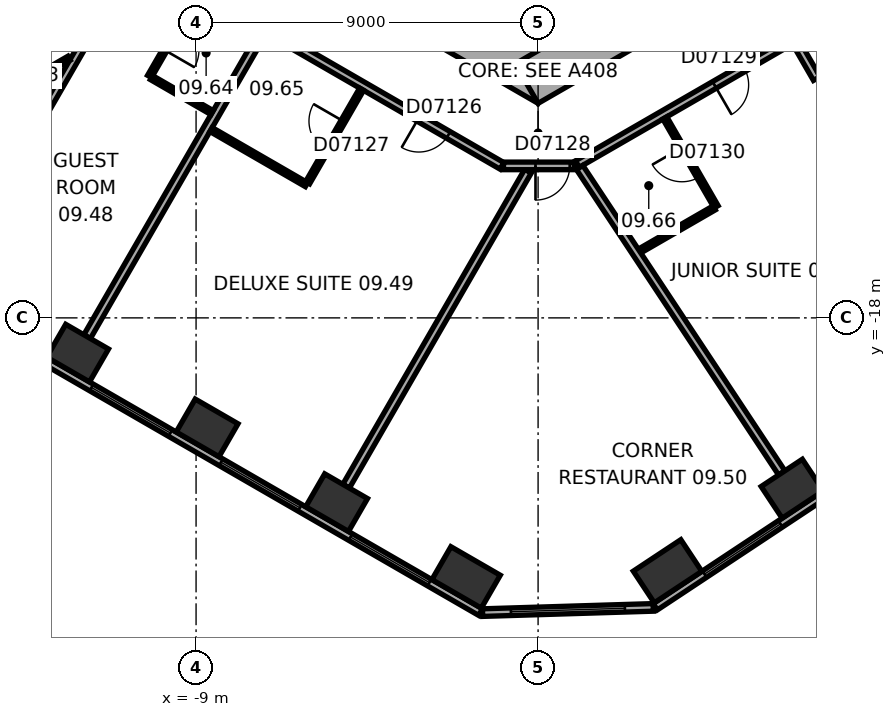
"""IFC4 building model, lengths in metres.
Left out: names, types, materials, properties, quantities, classifications, styles, units other than length and angle.
Written with IfcOpenShell. Run it as: python <this file> out.ifc"""

import sys

from ifc_helpers import new_model, si_unit, direction, frame, frame_2d, origin, origin_2d, place, context, subcontext, project, spatial, rectangle, extrude, element, fill, save


model = new_model("IFC4")
c1 = context("Model", 3, precision=1e-05, world=origin(), true_north=direction((0.0, 1.0)))
c2 = subcontext(c1, "Body", "Model", "MODEL_VIEW")
j1 = project(units=[si_unit("LENGTHUNIT", "METRE"), si_unit("PLANEANGLEUNIT", "RADIAN")], contexts=[c1])
p1 = place(None, origin())
s1 = spatial("IfcSite", under=j1, at=p1, CompositionType="ELEMENT")
p2 = place(p1, origin())
s2 = spatial("IfcBuilding", under=s1, at=p2, CompositionType="ELEMENT")
p3 = place(p2, frame((0.0, 0.0, 50.6)))
s3 = spatial("IfcBuildingStorey", under=s2, at=p3, CompositionType="ELEMENT", Elevation=50.6)
for number, where, z_axis, x_axis in (
    (1, (-12.117, -18.927, 0.0), (0.0, 0.0, 1.0), (0.866, -0.5, 0.0)),
    (2, (-8.71, -20.895, 0.0), (0.0, 0.0, 1.0), (0.866, -0.5, 0.0)),
    (3, (-5.302, -22.862, 0.0), (0.0, 0.0, 1.0), (0.866, -0.5, 0.0)),
):
    element("IfcColumn", number, at=place(p3, frame(where, z_axis=z_axis, x_axis=x_axis)), inside=s3, PredefinedType="COLUMN", context=c2, shape_type="SweptSolid", body=[
        extrude(rectangle(XDim=1.3, YDim=1.0, at=origin_2d()), origin(), (0.0, 0.0, 1.0), 3.3),
    ])
for number, where, z_axis, x_axis in (
    (4, (-1.895, -24.829, 0.0), (0.0, 0.0, 1.0), (0.866, -0.5, 0.0)),
    (5, (3.407, -24.667, 0.0), (0.0, 0.0, 1.0), (0.834, 0.552, 0.0)),
):
    element("IfcColumn", number, at=place(p3, frame(where, z_axis=z_axis, x_axis=x_axis)), inside=s3, PredefinedType="COLUMN", context=c2, shape_type="SweptSolid", body=[
        extrude(rectangle(XDim=1.5, YDim=1.0, at=origin_2d()), origin(), (0.0, 0.0, 1.0), 3.3),
    ])
p4 = place(p3, frame((6.688, -22.496, 0.0), z_axis=(0.0, 0.0, 1.0), x_axis=(0.833885822067, 0.551936985312, 0.0)))
e6 = element("IfcColumn", 6, at=p4, inside=s3, PredefinedType="COLUMN", context=c2, shape_type="SweptSolid", body=[
    extrude(rectangle(XDim=1.3, YDim=1.0, at=origin_2d()), origin(), (0.0, 0.0, 1.0), 3.3),
])
p5 = place(p3, frame((-10.4, -5.658, 0.0), z_axis=(0.0, 0.0, 1.0), x_axis=(0.866021384402, -0.500006961711, 0.0)))
e7 = element("IfcWall", 7, at=p5, inside=s3, PredefinedType="SHEAR", context=c2, shape_type="SweptSolid", body=[
    extrude(rectangle(XDim=12.355, YDim=1.2, at=frame_2d((6.178, 0.0))), origin(), (0.0, 0.0, 1.0), 3.3),
])
p6 = place(p5, frame((6.378, 0.0, 0.0)))
e8 = element("IfcOpeningElement", 8, at=p6, cuts=e7, PredefinedType="OPENING", context=c2, shape_type="SweptSolid", body=[
    extrude(rectangle(XDim=1.5, YDim=2.1, at=frame_2d((0.75, 1.05))), frame((0.0, 0.61, 0.0), z_axis=(0.0, -1.0, 0.0), x_axis=(1.0, 0.0, 0.0)), (0.0, 0.0, 1.0), 1.22),
])
p7 = place(p5, frame((3.228, 0.0, 0.0)))
e9 = element("IfcOpeningElement", 9, at=p7, cuts=e7, PredefinedType="OPENING", context=c2, shape_type="SweptSolid", body=[
    extrude(rectangle(XDim=0.9, YDim=2.1, at=frame_2d((0.45, 1.05))), frame((0.0, 0.61, 0.0), z_axis=(0.0, -1.0, 0.0), x_axis=(1.0, 0.0, 0.0)), (0.0, 0.0, 1.0), 1.22),
])
p8 = place(p3, frame((-0.3, -11.836, 0.0), z_axis=(0.0, 0.0, 1.0), x_axis=(0.866021384402, 0.500006961711, 0.0)))
e10 = element("IfcWall", 10, at=p8, inside=s3, PredefinedType="SHEAR", context=c2, shape_type="SweptSolid", body=[
    extrude(rectangle(XDim=12.355, YDim=1.2, at=frame_2d((6.178, 0.0))), origin(), (0.0, 0.0, 1.0), 3.3),
])
p9 = place(p8, frame((2.828, 0.0, 0.0)))
e11 = element("IfcOpeningElement", 11, at=p9, cuts=e10, PredefinedType="OPENING", context=c2, shape_type="SweptSolid", body=[
    extrude(rectangle(XDim=0.9, YDim=2.1, at=frame_2d((0.45, 1.05))), frame((0.0, 0.61, 0.0), z_axis=(0.0, -1.0, 0.0), x_axis=(1.0, 0.0, 0.0)), (0.0, 0.0, 1.0), 1.22),
])
p10 = place(p8, frame((5.428, 0.0, 0.0)))
e12 = element("IfcOpeningElement", 12, at=p10, cuts=e10, PredefinedType="OPENING", context=c2, shape_type="SweptSolid", body=[
    extrude(rectangle(XDim=0.9, YDim=2.1, at=frame_2d((0.45, 1.05))), frame((0.0, 0.61, 0.0), z_axis=(0.0, -1.0, 0.0), x_axis=(1.0, 0.0, 0.0)), (0.0, 0.0, 1.0), 1.22),
])
p11 = place(p8, frame((7.928, 0.0, 0.0)))
e13 = element("IfcOpeningElement", 13, at=p11, cuts=e10, PredefinedType="OPENING", context=c2, shape_type="SweptSolid", body=[
    extrude(rectangle(XDim=1.1, YDim=2.1, at=frame_2d((0.55, 1.05))), frame((0.0, 0.61, 0.0), z_axis=(0.0, -1.0, 0.0), x_axis=(1.0, 0.0, 0.0)), (0.0, 0.0, 1.0), 1.22),
])
p12 = place(p3, frame((-19.914, -15.119, 0.0), z_axis=(0.0, 0.0, 1.0), x_axis=(0.866025418898, -0.499999973822, 0.0)))
e14 = element("IfcWall", 14, at=p12, inside=s3, PredefinedType="STANDARD", context=c2, shape_type="SweptSolid", body=[
    extrude(rectangle(XDim=21.246, YDim=0.2, at=frame_2d((10.623, 0.0))), origin(), (0.0, 0.0, 1.0), 3.3),
])
p13 = place(p12, frame((1.555, 0.0, 0.8)))
e15 = element("IfcOpeningElement", 15, at=p13, cuts=e14, PredefinedType="OPENING", context=c2, shape_type="SweptSolid", body=[
    extrude(rectangle(XDim=2.4, YDim=1.7, at=frame_2d((1.2, 0.85))), frame((0.0, 0.11, 0.0), z_axis=(0.0, -1.0, 0.0), x_axis=(1.0, 0.0, 0.0)), (0.0, 0.0, 1.0), 0.22),
])
p14 = place(p12, frame((5.489, 0.0, 0.8)))
e16 = element("IfcOpeningElement", 16, at=p14, cuts=e14, PredefinedType="OPENING", context=c2, shape_type="SweptSolid", body=[
    extrude(rectangle(XDim=2.4, YDim=1.7, at=frame_2d((1.2, 0.85))), frame((0.0, 0.11, 0.0), z_axis=(0.0, -1.0, 0.0), x_axis=(1.0, 0.0, 0.0)), (0.0, 0.0, 1.0), 0.22),
])
p15 = place(p12, frame((9.424, 0.0, 0.8)))
e17 = element("IfcOpeningElement", 17, at=p15, cuts=e14, PredefinedType="OPENING", context=c2, shape_type="SweptSolid", body=[
    extrude(rectangle(XDim=2.4, YDim=1.7, at=frame_2d((1.2, 0.85))), frame((0.0, 0.11, 0.0), z_axis=(0.0, -1.0, 0.0), x_axis=(1.0, 0.0, 0.0)), (0.0, 0.0, 1.0), 0.22),
])
p16 = place(p12, frame((13.358, 0.0, 0.8)))
e18 = element("IfcOpeningElement", 18, at=p16, cuts=e14, PredefinedType="OPENING", context=c2, shape_type="SweptSolid", body=[
    extrude(rectangle(XDim=2.4, YDim=1.7, at=frame_2d((1.2, 0.85))), frame((0.0, 0.11, 0.0), z_axis=(0.0, -1.0, 0.0), x_axis=(1.0, 0.0, 0.0)), (0.0, 0.0, 1.0), 0.22),
])
p17 = place(p12, frame((17.293, 0.0, 0.8)))
e19 = element("IfcOpeningElement", 19, at=p17, cuts=e14, PredefinedType="OPENING", context=c2, shape_type="SweptSolid", body=[
    extrude(rectangle(XDim=2.4, YDim=1.7, at=frame_2d((1.2, 0.85))), frame((0.0, 0.11, 0.0), z_axis=(0.0, -1.0, 0.0), x_axis=(1.0, 0.0, 0.0)), (0.0, 0.0, 1.0), 0.22),
])
p18 = place(p3, frame((-1.461, -25.755, 0.0), z_axis=(0.0, 0.0, 1.0), x_axis=(0.999533823446, 0.030530898895, 0.0)))
e20 = element("IfcWall", 20, at=p18, inside=s3, PredefinedType="STANDARD", context=c2, shape_type="SweptSolid", body=[
    extrude(rectangle(XDim=4.494, YDim=0.2, at=frame_2d((2.247, 0.0))), origin(), (0.0, 0.0, 1.0), 3.3),
])
p19 = place(p18, frame((0.747, 0.0, 0.8)))
e21 = element("IfcOpeningElement", 21, at=p19, cuts=e20, PredefinedType="OPENING", context=c2, shape_type="SweptSolid", body=[
    extrude(rectangle(XDim=3.0, YDim=1.7, at=frame_2d((1.5, 0.85))), frame((0.0, 0.11, 0.0), z_axis=(0.0, -1.0, 0.0), x_axis=(1.0, 0.0, 0.0)), (0.0, 0.0, 1.0), 0.22),
])
p20 = place(p3, frame((3.083, -25.601, 0.0), z_axis=(0.0, 0.0, 1.0), x_axis=(0.833884295743, 0.551939291329, 0.0)))
e22 = element("IfcWall", 22, at=p20, inside=s3, PredefinedType="STANDARD", context=c2, shape_type="SweptSolid", body=[
    extrude(rectangle(XDim=21.246, YDim=0.2, at=frame_2d((10.623, 0.0))), origin(), (0.0, 0.0, 1.0), 3.3),
])
p21 = place(p20, frame((1.553, 0.0, 0.8)))
e23 = element("IfcOpeningElement", 23, at=p21, cuts=e22, PredefinedType="OPENING", context=c2, shape_type="SweptSolid", body=[
    extrude(rectangle(XDim=2.4, YDim=1.7, at=frame_2d((1.2, 0.85))), frame((0.0, 0.11, 0.0), z_axis=(0.0, -1.0, 0.0), x_axis=(1.0, 0.0, 0.0)), (0.0, 0.0, 1.0), 0.22),
])
p22 = place(p20, frame((5.488, 0.0, 0.8)))
e24 = element("IfcOpeningElement", 24, at=p22, cuts=e22, PredefinedType="OPENING", context=c2, shape_type="SweptSolid", body=[
    extrude(rectangle(XDim=2.4, YDim=1.7, at=frame_2d((1.2, 0.85))), frame((0.0, 0.11, 0.0), z_axis=(0.0, -1.0, 0.0), x_axis=(1.0, 0.0, 0.0)), (0.0, 0.0, 1.0), 0.22),
])
p23 = place(p20, frame((9.422, 0.0, 0.8)))
e25 = element("IfcOpeningElement", 25, at=p23, cuts=e22, PredefinedType="OPENING", context=c2, shape_type="SweptSolid", body=[
    extrude(rectangle(XDim=2.4, YDim=1.7, at=frame_2d((1.2, 0.85))), frame((0.0, 0.11, 0.0), z_axis=(0.0, -1.0, 0.0), x_axis=(1.0, 0.0, 0.0)), (0.0, 0.0, 1.0), 0.22),
])
p24 = place(p20, frame((13.357, 0.0, 0.8)))
e26 = element("IfcOpeningElement", 26, at=p24, cuts=e22, PredefinedType="OPENING", context=c2, shape_type="SweptSolid", body=[
    extrude(rectangle(XDim=2.4, YDim=1.7, at=frame_2d((1.2, 0.85))), frame((0.0, 0.11, 0.0), z_axis=(0.0, -1.0, 0.0), x_axis=(1.0, 0.0, 0.0)), (0.0, 0.0, 1.0), 0.22),
])
p25 = place(p20, frame((17.291, 0.0, 0.8)))
e27 = element("IfcOpeningElement", 27, at=p25, cuts=e22, PredefinedType="OPENING", context=c2, shape_type="SweptSolid", body=[
    extrude(rectangle(XDim=2.4, YDim=1.7, at=frame_2d((1.2, 0.85))), frame((0.0, 0.11, 0.0), z_axis=(0.0, -1.0, 0.0), x_axis=(1.0, 0.0, 0.0)), (0.0, 0.0, 1.0), 0.22),
])
p26 = place(p3, frame((-15.274, -16.527, 0.0), z_axis=(0.0, 0.0, 1.0), x_axis=(0.49998823431, 0.866032196602, 0.0)))
e28 = element("IfcWall", 28, at=p26, inside=s3, PredefinedType="PARTITIONING", context=c2, shape_type="SweptSolid", body=[
    extrude(rectangle(XDim=9.25, YDim=0.2, at=frame_2d((4.625, 0.0))), origin(), (0.0, 0.0, 1.0), 3.05),
])
p27 = place(p3, frame((-12.342, -11.167, 0.0), z_axis=(0.0, 0.0, 1.0), x_axis=(-0.865992557167, -0.500056887695, 0.0)))
e29 = element("IfcWall", 29, at=p27, inside=s3, PredefinedType="PARTITIONING", context=c2, shape_type="SweptSolid", body=[
    extrude(rectangle(XDim=1.769, YDim=0.12, at=frame_2d((0.885, 0.0))), origin(), (0.0, 0.0, 1.0), 3.05),
])
p28 = place(p3, frame((-11.867, -18.494, 0.0), z_axis=(0.0, 0.0, 1.0), x_axis=(0.499999662836, 0.866025598446, 0.0)))
e30 = element("IfcWall", 30, at=p28, inside=s3, PredefinedType="PARTITIONING", context=c2, shape_type="SweptSolid", body=[
    extrude(rectangle(XDim=9.25, YDim=0.2, at=frame_2d((4.625, 0.0))), origin(), (0.0, 0.0, 1.0), 2.6),
])
p29 = place(p3, frame((-11.615, -7.843, 0.0), z_axis=(0.0, 0.0, 1.0), x_axis=(0.866026466995, -0.499998158461, 0.0)))
e31 = element("IfcWall", 31, at=p29, inside=s3, PredefinedType="PARTITIONING", context=c2, shape_type="SweptSolid", body=[
    extrude(rectangle(XDim=12.315, YDim=0.2, at=frame_2d((6.158, 0.0))), origin(), (0.0, 0.0, 1.0), 3.05),
])
p30 = place(p29, frame((1.665, 0.0, 0.0)))
e32 = element("IfcOpeningElement", 32, at=p30, cuts=e31, PredefinedType="OPENING", context=c2, shape_type="SweptSolid", body=[
    extrude(rectangle(XDim=0.9, YDim=2.1, at=frame_2d((0.45, 1.05))), frame((0.0, 0.11, 0.0), z_axis=(0.0, -1.0, 0.0), x_axis=(1.0, 0.0, 0.0)), (0.0, 0.0, 1.0), 0.22),
])
p31 = place(p29, frame((9.787, 0.0, 0.0)))
e33 = element("IfcOpeningElement", 33, at=p31, cuts=e31, PredefinedType="OPENING", context=c2, shape_type="SweptSolid", body=[
    extrude(rectangle(XDim=0.9, YDim=2.1, at=frame_2d((0.45, 1.05))), frame((0.0, 0.11, 0.0), z_axis=(0.0, -1.0, 0.0), x_axis=(1.0, 0.0, 0.0)), (0.0, 0.0, 1.0), 0.22),
])
p32 = place(p3, frame((-10.224, -11.648, 0.0), z_axis=(0.0, 0.0, 1.0), x_axis=(0.500004234368, 0.866022959057, 0.0)))
e34 = element("IfcWall", 34, at=p32, inside=s3, PredefinedType="PARTITIONING", context=c2, shape_type="SweptSolid", body=[
    extrude(rectangle(XDim=2.5, YDim=0.12, at=frame_2d((1.25, 0.0))), origin(), (0.0, 0.0, 1.0), 3.05),
])
p33 = place(p32, frame((0.8, 0.0, 0.0)))
e35 = element("IfcOpeningElement", 35, at=p33, cuts=e34, PredefinedType="OPENING", context=c2, shape_type="SweptSolid", body=[
    extrude(rectangle(XDim=0.9, YDim=2.1, at=frame_2d((0.45, 1.05))), frame((0.0, 0.07, 0.0), z_axis=(0.0, -1.0, 0.0), x_axis=(1.0, 0.0, 0.0)), (0.0, 0.0, 1.0), 0.14),
])
p34 = place(p3, frame((-8.579, -12.598, 0.0), z_axis=(0.0, 0.0, 1.0), x_axis=(-0.866046386007, 0.499963655964, 0.0)))
e36 = element("IfcWall", 36, at=p34, inside=s3, PredefinedType="PARTITIONING", context=c2, shape_type="SweptSolid", body=[
    extrude(rectangle(XDim=1.84, YDim=0.12, at=frame_2d((0.92, 0.0))), origin(), (0.0, 0.0, 1.0), 3.05),
])
p35 = place(p3, frame((-6.094, -14.495, 0.0), z_axis=(0.0, 0.0, 1.0), x_axis=(-0.866032775405, 0.499987231761, 0.0)))
e37 = element("IfcWall", 37, at=p35, inside=s3, PredefinedType="PARTITIONING", context=c2, shape_type="SweptSolid", body=[
    extrude(rectangle(XDim=2.9, YDim=0.12, at=frame_2d((1.45, 0.0))), origin(), (0.0, 0.0, 1.0), 3.05),
])
p36 = place(p3, frame((-5.052, -22.429, 0.0), z_axis=(0.0, 0.0, 1.0), x_axis=(0.500004329283, 0.866022904257, 0.0)))
e38 = element("IfcWall", 38, at=p36, inside=s3, PredefinedType="PARTITIONING", context=c2, shape_type="SweptSolid", body=[
    extrude(rectangle(XDim=9.572, YDim=0.2, at=frame_2d((4.786, 0.0))), origin(), (0.0, 0.0, 1.0), 3.05),
])
p37 = place(p3, frame((-4.644, -11.983, 0.0), z_axis=(0.0, 0.0, 1.0), x_axis=(-0.499985389037, -0.866033839264, 0.0)))
e39 = element("IfcWall", 39, at=p37, inside=s3, PredefinedType="PARTITIONING", context=c2, shape_type="SweptSolid", body=[
    extrude(rectangle(XDim=2.84, YDim=0.12, at=frame_2d((1.42, 0.0))), origin(), (0.0, 0.0, 1.0), 3.05),
])
p38 = place(p37, frame((0.97, 0.0, 0.0)))
e40 = element("IfcOpeningElement", 40, at=p38, cuts=e39, PredefinedType="OPENING", context=c2, shape_type="SweptSolid", body=[
    extrude(rectangle(XDim=0.9, YDim=2.1, at=frame_2d((0.45, 1.05))), frame((0.0, 0.07, 0.0), z_axis=(0.0, -1.0, 0.0), x_axis=(1.0, 0.0, 0.0)), (0.0, 0.0, 1.0), 0.14),
])
p39 = place(p3, frame((-0.91, -14.001, 0.0), z_axis=(0.0, 0.0, 1.0), x_axis=(1.0, 0.0, 0.0)))
e41 = element("IfcWall", 41, at=p39, inside=s3, PredefinedType="PARTITIONING", context=c2, shape_type="SweptSolid", body=[
    extrude(rectangle(XDim=1.86, YDim=0.2, at=frame_2d((0.93, 0.0))), origin(), (0.0, 0.0, 1.0), 3.05),
])
p40 = place(p39, frame((0.842, 0.0, 0.0)))
e42 = element("IfcOpeningElement", 42, at=p40, cuts=e41, PredefinedType="OPENING", context=c2, shape_type="SweptSolid", body=[
    extrude(rectangle(XDim=0.9, YDim=2.1, at=frame_2d((0.45, 1.05))), frame((0.0, 0.11, 0.0), z_axis=(0.0, -1.0, 0.0), x_axis=(1.0, 0.0, 0.0)), (0.0, 0.0, 1.0), 0.22),
])
p41 = place(p3, frame((1.033, -13.953, 0.0), z_axis=(0.0, 0.0, 1.0), x_axis=(0.866017531406, 0.500013635111, 0.0)))
e43 = element("IfcWall", 43, at=p41, inside=s3, PredefinedType="PARTITIONING", context=c2, shape_type="SweptSolid", body=[
    extrude(rectangle(XDim=6.58, YDim=0.2, at=frame_2d((3.29, 0.0))), origin(), (0.0, 0.0, 1.0), 3.05),
])
p42 = place(p41, frame((4.165, 0.0, 0.0)))
e44 = element("IfcOpeningElement", 44, at=p42, cuts=e43, PredefinedType="OPENING", context=c2, shape_type="SweptSolid", body=[
    extrude(rectangle(XDim=0.9, YDim=2.1, at=frame_2d((0.45, 1.05))), frame((0.0, 0.11, 0.0), z_axis=(0.0, -1.0, 0.0), x_axis=(1.0, 0.0, 0.0)), (0.0, 0.0, 1.0), 0.22),
])
p43 = place(p3, frame((3.335, -12.739, 0.0), z_axis=(0.0, 0.0, 1.0), x_axis=(0.499980770555, -0.866036505625, 0.0)))
e45 = element("IfcWall", 45, at=p43, inside=s3, PredefinedType="PARTITIONING", context=c2, shape_type="SweptSolid", body=[
    extrude(rectangle(XDim=2.7, YDim=0.12, at=frame_2d((1.35, 0.0))), origin(), (0.0, 0.0, 1.0), 3.05),
])
p44 = place(p43, frame((0.9, 0.0, 0.0)))
e46 = element("IfcOpeningElement", 46, at=p44, cuts=e45, PredefinedType="OPENING", context=c2, shape_type="SweptSolid", body=[
    extrude(rectangle(XDim=0.9, YDim=2.1, at=frame_2d((0.45, 1.05))), frame((0.0, 0.07, 0.0), z_axis=(0.0, -1.0, 0.0), x_axis=(1.0, 0.0, 0.0)), (0.0, 0.0, 1.0), 0.14),
])
p45 = place(p3, frame((4.633, -15.107, 0.0), z_axis=(0.0, 0.0, 1.0), x_axis=(-0.866022496617, -0.500005035328, 0.0)))
e47 = element("IfcWall", 47, at=p45, inside=s3, PredefinedType="PARTITIONING", context=c2, shape_type="SweptSolid", body=[
    extrude(rectangle(XDim=2.269, YDim=0.12, at=frame_2d((1.134, 0.0))), origin(), (0.0, 0.0, 1.0), 3.05),
])
p46 = place(p3, frame((6.412, -22.079, 0.0), z_axis=(0.0, 0.0, 1.0), x_axis=(-0.551919507115, 0.83389739037, 0.0)))
e48 = element("IfcWall", 48, at=p46, inside=s3, PredefinedType="PARTITIONING", context=c2, shape_type="SweptSolid", body=[
    extrude(rectangle(XDim=9.635, YDim=0.2, at=frame_2d((4.817, 0.0))), origin(), (0.0, 0.0, 1.0), 3.05),
])
p47 = place(p3, frame((6.782, -10.749, 0.0), z_axis=(0.0, 0.0, 1.0), x_axis=(0.500074377092, -0.865982457891, 0.0)))
e49 = element("IfcWall", 49, at=p47, inside=s3, PredefinedType="PARTITIONING", context=c2, shape_type="SweptSolid", body=[
    extrude(rectangle(XDim=1.101, YDim=0.2, at=frame_2d((0.55, 0.0))), origin(), (0.0, 0.0, 1.0), 3.05),
])
p48 = place(p15, origin())
e50 = element("IfcWindow", 50, at=p48, inside=s3, PartitioningType="SINGLE_PANEL", PredefinedType="WINDOW", context=c2, shape_type="SweptSolid", body=[
    extrude(rectangle(XDim=2.4, YDim=1.7, at=frame_2d((1.2, 0.85))), frame((0.0, 0.03, 0.0), z_axis=(0.0, -1.0, 0.0), x_axis=(1.0, 0.0, 0.0)), (0.0, 0.0, 1.0), 0.06),
])
fill(e17, e50)
p49 = place(p16, origin())
e51 = element("IfcWindow", 51, at=p49, inside=s3, PartitioningType="SINGLE_PANEL", PredefinedType="WINDOW", context=c2, shape_type="SweptSolid", body=[
    extrude(rectangle(XDim=2.4, YDim=1.7, at=frame_2d((1.2, 0.85))), frame((0.0, 0.03, 0.0), z_axis=(0.0, -1.0, 0.0), x_axis=(1.0, 0.0, 0.0)), (0.0, 0.0, 1.0), 0.06),
])
fill(e18, e51)
p50 = place(p17, origin())
e52 = element("IfcWindow", 52, at=p50, inside=s3, PartitioningType="SINGLE_PANEL", PredefinedType="WINDOW", context=c2, shape_type="SweptSolid", body=[
    extrude(rectangle(XDim=2.4, YDim=1.7, at=frame_2d((1.2, 0.85))), frame((0.0, 0.03, 0.0), z_axis=(0.0, -1.0, 0.0), x_axis=(1.0, 0.0, 0.0)), (0.0, 0.0, 1.0), 0.06),
])
fill(e19, e52)
p51 = place(p19, origin())
e53 = element("IfcWindow", 53, at=p51, inside=s3, PartitioningType="SINGLE_PANEL", PredefinedType="WINDOW", context=c2, shape_type="SweptSolid", body=[
    extrude(rectangle(XDim=3.0, YDim=1.7, at=frame_2d((1.5, 0.85))), frame((0.0, 0.03, 0.0), z_axis=(0.0, -1.0, 0.0), x_axis=(1.0, 0.0, 0.0)), (0.0, 0.0, 1.0), 0.06),
])
fill(e21, e53)
p52 = place(p21, origin())
e54 = element("IfcWindow", 54, at=p52, inside=s3, PartitioningType="SINGLE_PANEL", PredefinedType="WINDOW", context=c2, shape_type="SweptSolid", body=[
    extrude(rectangle(XDim=2.4, YDim=1.7, at=frame_2d((1.2, 0.85))), frame((0.0, 0.03, 0.0), z_axis=(0.0, -1.0, 0.0), x_axis=(1.0, 0.0, 0.0)), (0.0, 0.0, 1.0), 0.06),
])
fill(e23, e54)
p53 = place(p31, origin())
e55 = element("IfcDoor", 55, at=p53, inside=s3, OperationType="SINGLE_SWING_LEFT", PredefinedType="DOOR", context=c2, shape_type="SweptSolid", body=[
    extrude(rectangle(XDim=0.9, YDim=2.1, at=frame_2d((0.45, 1.05))), frame((0.0, 0.025, 0.0), z_axis=(0.0, -1.0, 0.0), x_axis=(1.0, 0.0, 0.0)), (0.0, 0.0, 1.0), 0.05),
])
fill(e33, e55)
p54 = place(p38, origin())
e56 = element("IfcDoor", 56, at=p54, inside=s3, OperationType="SINGLE_SWING_LEFT", PredefinedType="DOOR", context=c2, shape_type="SweptSolid", body=[
    extrude(rectangle(XDim=0.9, YDim=2.1, at=frame_2d((0.45, 1.05))), frame((0.0, 0.025, 0.0), z_axis=(0.0, -1.0, 0.0), x_axis=(1.0, 0.0, 0.0)), (0.0, 0.0, 1.0), 0.05),
])
fill(e40, e56)
p55 = place(p40, origin())
e57 = element("IfcDoor", 57, at=p55, inside=s3, OperationType="SINGLE_SWING_LEFT", PredefinedType="DOOR", context=c2, shape_type="SweptSolid", body=[
    extrude(rectangle(XDim=0.9, YDim=2.1, at=frame_2d((0.45, 1.05))), frame((0.0, 0.025, 0.0), z_axis=(0.0, -1.0, 0.0), x_axis=(1.0, 0.0, 0.0)), (0.0, 0.0, 1.0), 0.05),
])
fill(e42, e57)
p56 = place(p42, origin())
e58 = element("IfcDoor", 58, at=p56, inside=s3, OperationType="SINGLE_SWING_LEFT", PredefinedType="DOOR", context=c2, shape_type="SweptSolid", body=[
    extrude(rectangle(XDim=0.9, YDim=2.1, at=frame_2d((0.45, 1.05))), frame((0.0, 0.025, 0.0), z_axis=(0.0, -1.0, 0.0), x_axis=(1.0, 0.0, 0.0)), (0.0, 0.0, 1.0), 0.05),
])
fill(e44, e58)
p57 = place(p44, origin())
e59 = element("IfcDoor", 59, at=p57, inside=s3, OperationType="SINGLE_SWING_LEFT", PredefinedType="DOOR", context=c2, shape_type="SweptSolid", body=[
    extrude(rectangle(XDim=0.9, YDim=2.1, at=frame_2d((0.45, 1.05))), frame((0.0, 0.025, 0.0), z_axis=(0.0, -1.0, 0.0), x_axis=(1.0, 0.0, 0.0)), (0.0, 0.0, 1.0), 0.05),
])
fill(e46, e59)
save(model, sys.argv[1])
